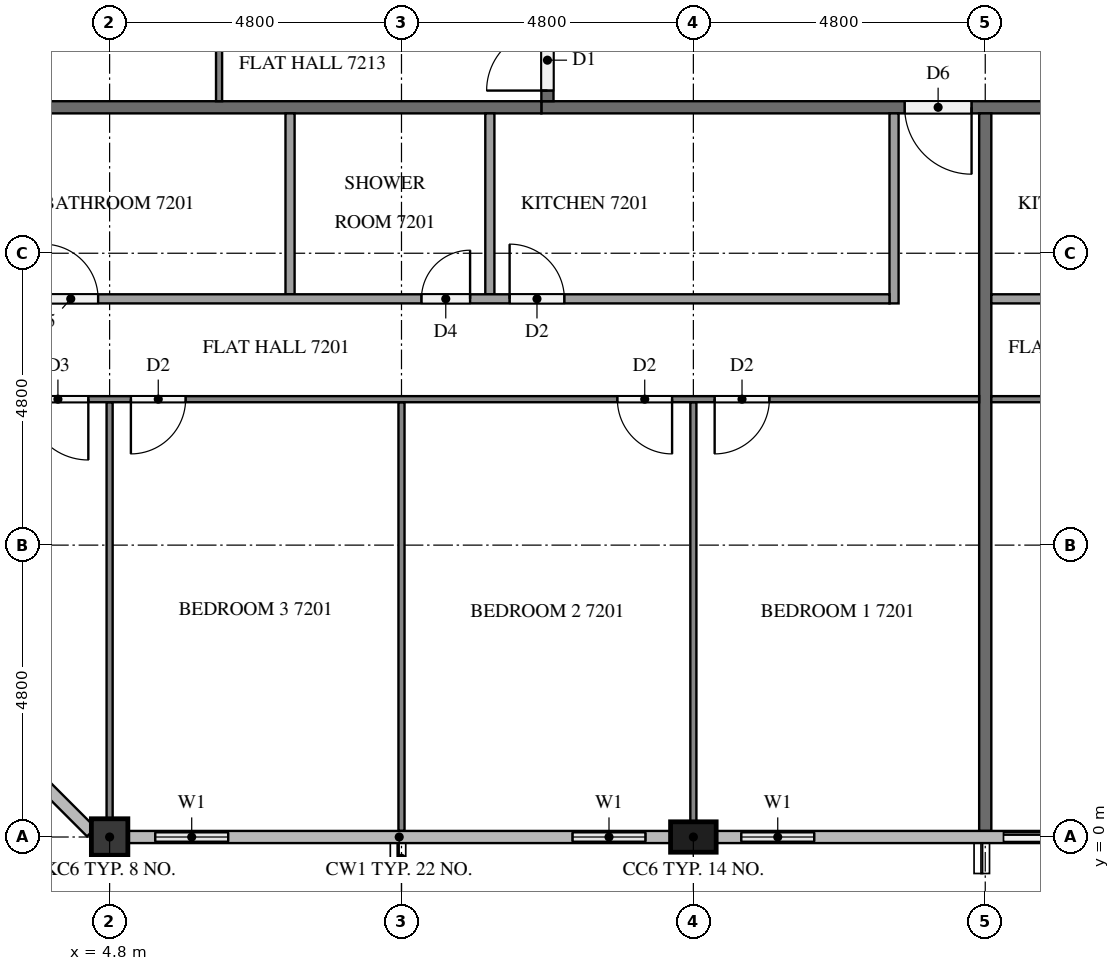
"""IFC4 building model, lengths in metres.
Left out: names, types, materials, properties, quantities, classifications, styles, units other than length and angle.
Written with IfcOpenShell. Run it as: python <this file> out.ifc"""

import sys

from ifc_helpers import new_model, si_unit, direction, frame, frame_2d, origin, origin_2d, place, context, subcontext, project, spatial, rectangle, extrude, element, fill, save


model = new_model("IFC4")
c1 = context("Model", 3, precision=1e-05, world=origin(), true_north=direction((0.0, 1.0)))
c2 = subcontext(c1, "Body", "Model", "MODEL_VIEW")
j1 = project(units=[si_unit("LENGTHUNIT", "METRE"), si_unit("PLANEANGLEUNIT", "RADIAN")], contexts=[c1])
p1 = place(None, origin())
s1 = spatial("IfcSite", under=j1, at=p1, CompositionType="ELEMENT")
p2 = place(p1, origin())
s2 = spatial("IfcBuilding", under=s1, at=p2, CompositionType="ELEMENT")
p3 = place(p2, frame((0.0, 0.0, 275.6)))
s3 = spatial("IfcBuildingStorey", under=s2, at=p3, CompositionType="ELEMENT", Elevation=275.6)
p4 = place(p3, frame((4.8, 0.0, 0.0), z_axis=(0.0, 0.0, 1.0), x_axis=(1.0, 0.0, 0.0)))
e1 = element("IfcColumn", 1, at=p4, inside=s3, PredefinedType="COLUMN", context=c2, shape_type="SweptSolid", body=[
    extrude(rectangle(XDim=0.6, YDim=0.6, at=origin_2d()), origin(), (0.0, 0.0, 1.0), 3.2),
])
p5 = place(p3, frame((14.4, 0.0, 0.0), z_axis=(0.0, 0.0, 1.0), x_axis=(1.0, 0.0, 0.0)))
e2 = element("IfcColumn", 2, at=p5, inside=s3, PredefinedType="COLUMN", context=c2, shape_type="SweptSolid", body=[
    extrude(rectangle(XDim=0.75, YDim=0.5, at=origin_2d()), origin(), (0.0, 0.0, 1.0), 3.2),
])
p6 = place(p3, frame((5.1, 0.0, 0.0), z_axis=(0.0, 0.0, 1.0), x_axis=(1.0, 0.0, 0.0)))
e3 = element("IfcWall", 3, at=p6, inside=s3, PredefinedType="SOLIDWALL", context=c2, shape_type="SweptSolid", body=[
    extrude(rectangle(XDim=2.1, YDim=0.15, at=frame_2d((1.05, 0.0))), origin(), (0.0, 0.0, 1.0), 3.2),
])
p7 = place(p6, frame((0.45, 0.0, 0.9)))
e4 = element("IfcOpeningElement", 4, at=p7, cuts=e3, PredefinedType="OPENING", context=c2, shape_type="SweptSolid", body=[
    extrude(rectangle(XDim=1.2, YDim=1.4, at=frame_2d((0.6, 0.7))), frame((0.0, 0.085, 0.0), z_axis=(0.0, -1.0, 0.0), x_axis=(1.0, 0.0, 0.0)), (0.0, 0.0, 1.0), 0.17),
])
p8 = place(p3, frame((12.0, 0.0, 0.0), z_axis=(0.0, 0.0, 1.0), x_axis=(1.0, 0.0, 0.0)))
e5 = element("IfcWall", 5, at=p8, inside=s3, PredefinedType="SOLIDWALL", context=c2, shape_type="SweptSolid", body=[
    extrude(rectangle(XDim=2.025, YDim=0.15, at=frame_2d((1.012, 0.0))), origin(), (0.0, 0.0, 1.0), 3.2),
])
p9 = place(p8, frame((0.413, 0.0, 0.9)))
e6 = element("IfcOpeningElement", 6, at=p9, cuts=e5, PredefinedType="OPENING", context=c2, shape_type="SweptSolid", body=[
    extrude(rectangle(XDim=1.2, YDim=1.4, at=frame_2d((0.6, 0.7))), frame((0.0, 0.085, 0.0), z_axis=(0.0, -1.0, 0.0), x_axis=(1.0, 0.0, 0.0)), (0.0, 0.0, 1.0), 0.17),
])
p10 = place(p3, frame((14.775, 0.0, 0.0), z_axis=(0.0, 0.0, 1.0), x_axis=(1.0, 0.0, 0.0)))
e7 = element("IfcWall", 7, at=p10, inside=s3, PredefinedType="SOLIDWALL", context=c2, shape_type="SweptSolid", body=[
    extrude(rectangle(XDim=2.025, YDim=0.15, at=frame_2d((1.013, 0.0))), origin(), (0.0, 0.0, 1.0), 3.2),
])
p11 = place(p10, frame((0.413, 0.0, 0.9)))
e8 = element("IfcOpeningElement", 8, at=p11, cuts=e7, PredefinedType="OPENING", context=c2, shape_type="SweptSolid", body=[
    extrude(rectangle(XDim=1.2, YDim=1.4, at=frame_2d((0.6, 0.7))), frame((0.0, 0.085, 0.0), z_axis=(0.0, -1.0, 0.0), x_axis=(1.0, 0.0, 0.0)), (0.0, 0.0, 1.0), 0.17),
])
p12 = place(p3, frame((19.2, 0.0, 0.0), z_axis=(0.0, 0.0, 1.0), x_axis=(1.0, 0.0, 0.0)))
e9 = element("IfcWall", 9, at=p12, inside=s3, PredefinedType="SOLIDWALL", context=c2, shape_type="SweptSolid", body=[
    extrude(rectangle(XDim=2.4, YDim=0.15, at=frame_2d((1.2, 0.0))), origin(), (0.0, 0.0, 1.0), 3.2),
])
p13 = place(p12, frame((0.3, 0.0, 0.0)))
e10 = element("IfcOpeningElement", 10, at=p13, cuts=e9, PredefinedType="OPENING", context=c2, shape_type="SweptSolid", body=[
    extrude(rectangle(XDim=1.8, YDim=2.4, at=frame_2d((0.9, 1.2))), frame((0.0, 0.085, 0.0), z_axis=(0.0, -1.0, 0.0), x_axis=(1.0, 0.0, 0.0)), (0.0, 0.0, 1.0), 0.17),
])
p14 = place(p3, frame((50.5, 12.0, 0.0), z_axis=(0.0, 0.0, 1.0), x_axis=(-1.0, 0.0, 0.0)))
e11 = element("IfcWall", 11, at=p14, inside=s3, PredefinedType="PARTITIONING", context=c2, shape_type="SweptSolid", body=[
    extrude(rectangle(XDim=38.6, YDim=0.2, at=frame_2d((19.3, 0.0))), origin(), (0.0, 0.0, 1.0), 3.2),
])
p15 = place(p14, frame((31.525, 0.0, 0.0)))
e12 = element("IfcOpeningElement", 12, at=p15, cuts=e11, PredefinedType="OPENING", context=c2, shape_type="SweptSolid", body=[
    extrude(rectangle(XDim=1.1, YDim=2.1, at=frame_2d((0.55, 1.05))), frame((0.0, 0.11, 0.0), z_axis=(0.0, -1.0, 0.0), x_axis=(1.0, 0.0, 0.0)), (0.0, 0.0, 1.0), 0.22),
])
p16 = place(p14, frame((19.575, 0.0, 0.0)))
e13 = element("IfcOpeningElement", 13, at=p16, cuts=e11, PredefinedType="OPENING", context=c2, shape_type="SweptSolid", body=[
    extrude(rectangle(XDim=1.0, YDim=2.1, at=frame_2d((0.5, 1.05))), frame((0.0, 0.11, 0.0), z_axis=(0.0, -1.0, 0.0), x_axis=(1.0, 0.0, 0.0)), (0.0, 0.0, 1.0), 0.22),
])
p17 = place(p14, frame((18.025, 0.0, 0.0)))
e14 = element("IfcOpeningElement", 14, at=p17, cuts=e11, PredefinedType="OPENING", context=c2, shape_type="SweptSolid", body=[
    extrude(rectangle(XDim=1.0, YDim=2.1, at=frame_2d((0.5, 1.05))), frame((0.0, 0.11, 0.0), z_axis=(0.0, -1.0, 0.0), x_axis=(1.0, 0.0, 0.0)), (0.0, 0.0, 1.0), 0.22),
])
p18 = place(p14, frame((1.225, 0.0, 0.0)))
e15 = element("IfcOpeningElement", 15, at=p18, cuts=e11, PredefinedType="OPENING", context=c2, shape_type="SweptSolid", body=[
    extrude(rectangle(XDim=1.0, YDim=2.1, at=frame_2d((0.5, 1.05))), frame((0.0, 0.11, 0.0), z_axis=(0.0, -1.0, 0.0), x_axis=(1.0, 0.0, 0.0)), (0.0, 0.0, 1.0), 0.22),
])
p19 = place(p3, frame((12.0, 12.1, 0.0), z_axis=(0.0, 0.0, 1.0), x_axis=(0.0, 1.0, 0.0)))
e16 = element("IfcWall", 16, at=p19, inside=s3, PredefinedType="PARTITIONING", context=c2, shape_type="SweptSolid", body=[
    extrude(rectangle(XDim=28.6, YDim=0.2, at=frame_2d((14.3, 0.0))), origin(), (0.0, 0.0, 1.0), 3.2),
])
p20 = place(p19, frame((24.175, 0.0, 0.0)))
e17 = element("IfcOpeningElement", 17, at=p20, cuts=e16, PredefinedType="OPENING", context=c2, shape_type="SweptSolid", body=[
    extrude(rectangle(XDim=1.0, YDim=2.1, at=frame_2d((0.5, 1.05))), frame((0.0, 0.11, 0.0), z_axis=(0.0, -1.0, 0.0), x_axis=(1.0, 0.0, 0.0)), (0.0, 0.0, 1.0), 0.22),
])
p21 = place(p19, frame((14.575, 0.0, 0.0)))
e18 = element("IfcOpeningElement", 18, at=p21, cuts=e16, PredefinedType="OPENING", context=c2, shape_type="SweptSolid", body=[
    extrude(rectangle(XDim=1.0, YDim=2.1, at=frame_2d((0.5, 1.05))), frame((0.0, 0.11, 0.0), z_axis=(0.0, -1.0, 0.0), x_axis=(1.0, 0.0, 0.0)), (0.0, 0.0, 1.0), 0.22),
])
p22 = place(p19, frame((0.175, 0.0, 0.0)))
e19 = element("IfcOpeningElement", 19, at=p22, cuts=e16, PredefinedType="OPENING", context=c2, shape_type="SweptSolid", body=[
    extrude(rectangle(XDim=1.0, YDim=2.1, at=frame_2d((0.5, 1.05))), frame((0.0, 0.11, 0.0), z_axis=(0.0, -1.0, 0.0), x_axis=(1.0, 0.0, 0.0)), (0.0, 0.0, 1.0), 0.22),
])
for number, where, z_axis, x_axis in (
    (20, (19.2, 11.9, 0.0), (0.0, 0.0, 1.0), (0.0, -1.0, 0.0)),
    (21, (0.1, 12.0, 0.0), (0.0, 0.0, 1.0), (1.0, 0.0, 0.0)),
):
    element("IfcWall", number, at=place(p3, frame(where, z_axis=z_axis, x_axis=x_axis)), inside=s3, PredefinedType="PARTITIONING", context=c2, shape_type="SweptSolid", body=[
        extrude(rectangle(XDim=11.8, YDim=0.2, at=frame_2d((5.9, 0.0))), origin(), (0.0, 0.0, 1.0), 3.2),
    ])
p23 = place(p3, frame((14.4, 7.15, 0.0), z_axis=(0.0, 0.0, 1.0), x_axis=(0.0, -1.0, 0.0)))
e22 = element("IfcWall", 22, at=p23, inside=s3, PredefinedType="PARTITIONING", context=c2, shape_type="SweptSolid", body=[
    extrude(rectangle(XDim=6.9, YDim=0.1, at=frame_2d((3.45, 0.0))), origin(), (0.0, 0.0, 1.0), 3.2),
])
p24 = place(p3, frame((9.6, 7.15, 0.0), z_axis=(0.0, 0.0, 1.0), x_axis=(0.0, -1.0, 0.0)))
e23 = element("IfcWall", 23, at=p24, inside=s3, PredefinedType="PARTITIONING", context=c2, shape_type="SweptSolid", body=[
    extrude(rectangle(XDim=7.05, YDim=0.1, at=frame_2d((3.525, 0.0))), origin(), (0.0, 0.0, 1.0), 3.2),
])
p25 = place(p3, frame((4.8, 7.15, 0.0), z_axis=(0.0, 0.0, 1.0), x_axis=(0.0, -1.0, 0.0)))
e24 = element("IfcWall", 24, at=p25, inside=s3, PredefinedType="PARTITIONING", context=c2, shape_type="SweptSolid", body=[
    extrude(rectangle(XDim=6.85, YDim=0.1, at=frame_2d((3.425, 0.0))), origin(), (0.0, 0.0, 1.0), 3.2),
])
p26 = place(p3, frame((19.1, 7.2, 0.0), z_axis=(0.0, 0.0, 1.0), x_axis=(-1.0, 0.0, 0.0)))
e25 = element("IfcWall", 25, at=p26, inside=s3, PredefinedType="PARTITIONING", context=c2, shape_type="SweptSolid", body=[
    extrude(rectangle(XDim=19.0, YDim=0.1, at=frame_2d((9.5, 0.0))), origin(), (0.0, 0.0, 1.0), 3.2),
])
p27 = place(p26, frame((3.45, 0.0, 0.0)))
e26 = element("IfcOpeningElement", 26, at=p27, cuts=e25, PredefinedType="OPENING", context=c2, shape_type="SweptSolid", body=[
    extrude(rectangle(XDim=0.9, YDim=2.1, at=frame_2d((0.45, 1.05))), frame((0.0, 0.06, 0.0), z_axis=(0.0, -1.0, 0.0), x_axis=(1.0, 0.0, 0.0)), (0.0, 0.0, 1.0), 0.12),
])
p28 = place(p26, frame((5.05, 0.0, 0.0)))
e27 = element("IfcOpeningElement", 27, at=p28, cuts=e25, PredefinedType="OPENING", context=c2, shape_type="SweptSolid", body=[
    extrude(rectangle(XDim=0.9, YDim=2.1, at=frame_2d((0.45, 1.05))), frame((0.0, 0.06, 0.0), z_axis=(0.0, -1.0, 0.0), x_axis=(1.0, 0.0, 0.0)), (0.0, 0.0, 1.0), 0.12),
])
p29 = place(p26, frame((13.05, 0.0, 0.0)))
e28 = element("IfcOpeningElement", 28, at=p29, cuts=e25, PredefinedType="OPENING", context=c2, shape_type="SweptSolid", body=[
    extrude(rectangle(XDim=0.9, YDim=2.1, at=frame_2d((0.45, 1.05))), frame((0.0, 0.06, 0.0), z_axis=(0.0, -1.0, 0.0), x_axis=(1.0, 0.0, 0.0)), (0.0, 0.0, 1.0), 0.12),
])
p30 = place(p26, frame((14.65, 0.0, 0.0)))
e29 = element("IfcOpeningElement", 29, at=p30, cuts=e25, PredefinedType="OPENING", context=c2, shape_type="SweptSolid", body=[
    extrude(rectangle(XDim=1.0, YDim=2.1, at=frame_2d((0.5, 1.05))), frame((0.0, 0.06, 0.0), z_axis=(0.0, -1.0, 0.0), x_axis=(1.0, 0.0, 0.0)), (0.0, 0.0, 1.0), 0.12),
])
for number, where, z_axis, x_axis in (
    (30, (11.053, 11.9, 0.0), (0.0, 0.0, 1.0), (0.0, -1.0, 0.0)),
    (31, (7.767, 11.9, 0.0), (0.0, 0.0, 1.0), (0.0, -1.0, 0.0)),
):
    element("IfcWall", number, at=place(p3, frame(where, z_axis=z_axis, x_axis=x_axis)), inside=s3, PredefinedType="PARTITIONING", context=c2, shape_type="SweptSolid", body=[
        extrude(rectangle(XDim=2.975, YDim=0.15, at=frame_2d((1.487, 0.0))), origin(), (0.0, 0.0, 1.0), 3.2),
    ])
p31 = place(p3, frame((17.7, 11.9, 0.0), z_axis=(0.0, 0.0, 1.0), x_axis=(0.0, -1.0, 0.0)))
e32 = element("IfcWall", 32, at=p31, inside=s3, PredefinedType="PARTITIONING", context=c2, shape_type="SweptSolid", body=[
    extrude(rectangle(XDim=3.125, YDim=0.15, at=frame_2d((1.562, 0.0))), origin(), (0.0, 0.0, 1.0), 3.2),
])
p32 = place(p3, frame((0.1, 8.85, 0.0), z_axis=(0.0, 0.0, 1.0), x_axis=(1.0, 0.0, 0.0)))
e33 = element("IfcWall", 33, at=p32, inside=s3, PredefinedType="PARTITIONING", context=c2, shape_type="SweptSolid", body=[
    extrude(rectangle(XDim=17.525, YDim=0.15, at=frame_2d((8.762, 0.0))), origin(), (0.0, 0.0, 1.0), 3.2),
])
p33 = place(p32, frame((11.278, 0.0, 0.0)))
e34 = element("IfcOpeningElement", 34, at=p33, cuts=e33, PredefinedType="OPENING", context=c2, shape_type="SweptSolid", body=[
    extrude(rectangle(XDim=0.9, YDim=2.1, at=frame_2d((0.45, 1.05))), frame((0.0, 0.085, 0.0), z_axis=(0.0, -1.0, 0.0), x_axis=(1.0, 0.0, 0.0)), (0.0, 0.0, 1.0), 0.17),
])
p34 = place(p32, frame((9.828, 0.0, 0.0)))
e35 = element("IfcOpeningElement", 35, at=p34, cuts=e33, PredefinedType="OPENING", context=c2, shape_type="SweptSolid", body=[
    extrude(rectangle(XDim=0.8, YDim=2.1, at=frame_2d((0.4, 1.05))), frame((0.0, 0.085, 0.0), z_axis=(0.0, -1.0, 0.0), x_axis=(1.0, 0.0, 0.0)), (0.0, 0.0, 1.0), 0.17),
])
p35 = place(p32, frame((3.611, 0.0, 0.0)))
e36 = element("IfcOpeningElement", 36, at=p35, cuts=e33, PredefinedType="OPENING", context=c2, shape_type="SweptSolid", body=[
    extrude(rectangle(XDim=0.9, YDim=2.1, at=frame_2d((0.45, 1.05))), frame((0.0, 0.085, 0.0), z_axis=(0.0, -1.0, 0.0), x_axis=(1.0, 0.0, 0.0)), (0.0, 0.0, 1.0), 0.17),
])
p36 = place(p32, frame((2.161, 0.0, 0.0)))
e37 = element("IfcOpeningElement", 37, at=p36, cuts=e33, PredefinedType="OPENING", context=c2, shape_type="SweptSolid", body=[
    extrude(rectangle(XDim=0.8, YDim=2.1, at=frame_2d((0.4, 1.05))), frame((0.0, 0.085, 0.0), z_axis=(0.0, -1.0, 0.0), x_axis=(1.0, 0.0, 0.0)), (0.0, 0.0, 1.0), 0.17),
])
p37 = place(p3, frame((31.1, 7.2, 0.0), z_axis=(0.0, 0.0, 1.0), x_axis=(-1.0, 0.0, 0.0)))
e38 = element("IfcWall", 38, at=p37, inside=s3, PredefinedType="PARTITIONING", context=c2, shape_type="SweptSolid", body=[
    extrude(rectangle(XDim=11.8, YDim=0.1, at=frame_2d((5.9, 0.0))), origin(), (0.0, 0.0, 1.0), 3.2),
])
p38 = place(p37, frame((3.45, 0.0, 0.0)))
e39 = element("IfcOpeningElement", 39, at=p38, cuts=e38, PredefinedType="OPENING", context=c2, shape_type="SweptSolid", body=[
    extrude(rectangle(XDim=0.9, YDim=2.1, at=frame_2d((0.45, 1.05))), frame((0.0, 0.06, 0.0), z_axis=(0.0, -1.0, 0.0), x_axis=(1.0, 0.0, 0.0)), (0.0, 0.0, 1.0), 0.12),
])
p39 = place(p37, frame((5.05, 0.0, 0.0)))
e40 = element("IfcOpeningElement", 40, at=p39, cuts=e38, PredefinedType="OPENING", context=c2, shape_type="SweptSolid", body=[
    extrude(rectangle(XDim=1.0, YDim=2.1, at=frame_2d((0.5, 1.05))), frame((0.0, 0.06, 0.0), z_axis=(0.0, -1.0, 0.0), x_axis=(1.0, 0.0, 0.0)), (0.0, 0.0, 1.0), 0.12),
])
p40 = place(p3, frame((19.3, 8.85, 0.0), z_axis=(0.0, 0.0, 1.0), x_axis=(1.0, 0.0, 0.0)))
e41 = element("IfcWall", 41, at=p40, inside=s3, PredefinedType="PARTITIONING", context=c2, shape_type="SweptSolid", body=[
    extrude(rectangle(XDim=10.325, YDim=0.15, at=frame_2d((5.163, 0.0))), origin(), (0.0, 0.0, 1.0), 3.2),
])
p41 = place(p40, frame((6.52, 0.0, 0.0)))
e42 = element("IfcOpeningElement", 42, at=p41, cuts=e41, PredefinedType="OPENING", context=c2, shape_type="SweptSolid", body=[
    extrude(rectangle(XDim=0.8, YDim=2.1, at=frame_2d((0.4, 1.05))), frame((0.0, 0.085, 0.0), z_axis=(0.0, -1.0, 0.0), x_axis=(1.0, 0.0, 0.0)), (0.0, 0.0, 1.0), 0.17),
])
p42 = place(p40, frame((4.97, 0.0, 0.0)))
e43 = element("IfcOpeningElement", 43, at=p42, cuts=e41, PredefinedType="OPENING", context=c2, shape_type="SweptSolid", body=[
    extrude(rectangle(XDim=0.9, YDim=2.1, at=frame_2d((0.45, 1.05))), frame((0.0, 0.085, 0.0), z_axis=(0.0, -1.0, 0.0), x_axis=(1.0, 0.0, 0.0)), (0.0, 0.0, 1.0), 0.17),
])
p43 = place(p3, frame((6.6, 12.1, 0.0), z_axis=(0.0, 0.0, 1.0), x_axis=(0.0, 1.0, 0.0)))
e44 = element("IfcWall", 44, at=p43, inside=s3, PredefinedType="PARTITIONING", context=c2, shape_type="SweptSolid", body=[
    extrude(rectangle(XDim=14.2, YDim=0.1, at=frame_2d((7.1, 0.0))), origin(), (0.0, 0.0, 1.0), 3.2),
])
p44 = place(p43, frame((3.35, 0.0, 0.0)))
e45 = element("IfcOpeningElement", 45, at=p44, cuts=e44, PredefinedType="OPENING", context=c2, shape_type="SweptSolid", body=[
    extrude(rectangle(XDim=1.0, YDim=2.1, at=frame_2d((0.5, 1.05))), frame((0.0, 0.06, 0.0), z_axis=(0.0, -1.0, 0.0), x_axis=(1.0, 0.0, 0.0)), (0.0, 0.0, 1.0), 0.12),
])
p45 = place(p43, frame((5.05, 0.0, 0.0)))
e46 = element("IfcOpeningElement", 46, at=p45, cuts=e44, PredefinedType="OPENING", context=c2, shape_type="SweptSolid", body=[
    extrude(rectangle(XDim=0.9, YDim=2.1, at=frame_2d((0.45, 1.05))), frame((0.0, 0.06, 0.0), z_axis=(0.0, -1.0, 0.0), x_axis=(1.0, 0.0, 0.0)), (0.0, 0.0, 1.0), 0.12),
])
p46 = place(p43, frame((13.0, 0.0, 0.0)))
e47 = element("IfcOpeningElement", 47, at=p46, cuts=e44, PredefinedType="OPENING", context=c2, shape_type="SweptSolid", body=[
    extrude(rectangle(XDim=0.9, YDim=2.1, at=frame_2d((0.45, 1.05))), frame((0.0, 0.06, 0.0), z_axis=(0.0, -1.0, 0.0), x_axis=(1.0, 0.0, 0.0)), (0.0, 0.0, 1.0), 0.12),
])
p47 = place(p7, origin())
e48 = element("IfcWindow", 48, at=p47, inside=s3, PartitioningType="SINGLE_PANEL", PredefinedType="WINDOW", context=c2, shape_type="SweptSolid", body=[
    extrude(rectangle(XDim=1.2, YDim=1.4, at=frame_2d((0.6, 0.7))), frame((0.0, 0.03, 0.0), z_axis=(0.0, -1.0, 0.0), x_axis=(1.0, 0.0, 0.0)), (0.0, 0.0, 1.0), 0.06),
])
fill(e4, e48)
p48 = place(p9, origin())
e49 = element("IfcWindow", 49, at=p48, inside=s3, PartitioningType="SINGLE_PANEL", PredefinedType="WINDOW", context=c2, shape_type="SweptSolid", body=[
    extrude(rectangle(XDim=1.2, YDim=1.4, at=frame_2d((0.6, 0.7))), frame((0.0, 0.03, 0.0), z_axis=(0.0, -1.0, 0.0), x_axis=(1.0, 0.0, 0.0)), (0.0, 0.0, 1.0), 0.06),
])
fill(e6, e49)
p49 = place(p11, origin())
e50 = element("IfcWindow", 50, at=p49, inside=s3, PartitioningType="SINGLE_PANEL", PredefinedType="WINDOW", context=c2, shape_type="SweptSolid", body=[
    extrude(rectangle(XDim=1.2, YDim=1.4, at=frame_2d((0.6, 0.7))), frame((0.0, 0.03, 0.0), z_axis=(0.0, -1.0, 0.0), x_axis=(1.0, 0.0, 0.0)), (0.0, 0.0, 1.0), 0.06),
])
fill(e8, e50)
p50 = place(p13, origin())
e51 = element("IfcDoor", 51, at=p50, inside=s3, OperationType="SLIDING_TO_LEFT", PredefinedType="DOOR", context=c2, shape_type="SweptSolid", body=[
    extrude(rectangle(XDim=1.8, YDim=2.4, at=frame_2d((0.9, 1.2))), frame((0.0, 0.025, 0.0), z_axis=(0.0, -1.0, 0.0), x_axis=(1.0, 0.0, 0.0)), (0.0, 0.0, 1.0), 0.05),
])
fill(e10, e51)
p51 = place(p15, origin())
e52 = element("IfcDoor", 52, at=p51, inside=s3, OperationType="SINGLE_SWING_LEFT", PredefinedType="DOOR", context=c2, shape_type="SweptSolid", body=[
    extrude(rectangle(XDim=1.1, YDim=2.1, at=frame_2d((0.55, 1.05))), frame((0.0, 0.025, 0.0), z_axis=(0.0, -1.0, 0.0), x_axis=(1.0, 0.0, 0.0)), (0.0, 0.0, 1.0), 0.05),
])
fill(e12, e52)
p52 = place(p22, origin())
e53 = element("IfcDoor", 53, at=p52, inside=s3, OperationType="SINGLE_SWING_LEFT", PredefinedType="DOOR", context=c2, shape_type="SweptSolid", body=[
    extrude(rectangle(XDim=1.0, YDim=2.1, at=frame_2d((0.5, 1.05))), frame((0.0, 0.025, 0.0), z_axis=(0.0, -1.0, 0.0), x_axis=(1.0, 0.0, 0.0)), (0.0, 0.0, 1.0), 0.05),
])
fill(e19, e53)
p53 = place(p27, origin())
e54 = element("IfcDoor", 54, at=p53, inside=s3, OperationType="SINGLE_SWING_RIGHT", PredefinedType="DOOR", context=c2, shape_type="SweptSolid", body=[
    extrude(rectangle(XDim=0.9, YDim=2.1, at=frame_2d((0.45, 1.05))), frame((0.0, 0.025, 0.0), z_axis=(0.0, -1.0, 0.0), x_axis=(1.0, 0.0, 0.0)), (0.0, 0.0, 1.0), 0.05),
])
fill(e26, e54)
p54 = place(p28, origin())
e55 = element("IfcDoor", 55, at=p54, inside=s3, OperationType="SINGLE_SWING_LEFT", PredefinedType="DOOR", context=c2, shape_type="SweptSolid", body=[
    extrude(rectangle(XDim=0.9, YDim=2.1, at=frame_2d((0.45, 1.05))), frame((0.0, 0.025, 0.0), z_axis=(0.0, -1.0, 0.0), x_axis=(1.0, 0.0, 0.0)), (0.0, 0.0, 1.0), 0.05),
])
fill(e27, e55)
p55 = place(p29, origin())
e56 = element("IfcDoor", 56, at=p55, inside=s3, OperationType="SINGLE_SWING_RIGHT", PredefinedType="DOOR", context=c2, shape_type="SweptSolid", body=[
    extrude(rectangle(XDim=0.9, YDim=2.1, at=frame_2d((0.45, 1.05))), frame((0.0, 0.025, 0.0), z_axis=(0.0, -1.0, 0.0), x_axis=(1.0, 0.0, 0.0)), (0.0, 0.0, 1.0), 0.05),
])
fill(e28, e56)
p56 = place(p30, origin())
e57 = element("IfcDoor", 57, at=p56, inside=s3, OperationType="SINGLE_SWING_LEFT", PredefinedType="DOOR", context=c2, shape_type="SweptSolid", body=[
    extrude(rectangle(XDim=1.0, YDim=2.1, at=frame_2d((0.5, 1.05))), frame((0.0, 0.025, 0.0), z_axis=(0.0, -1.0, 0.0), x_axis=(1.0, 0.0, 0.0)), (0.0, 0.0, 1.0), 0.05),
])
fill(e29, e57)
p57 = place(p33, origin())
e58 = element("IfcDoor", 58, at=p57, inside=s3, OperationType="SINGLE_SWING_LEFT", PredefinedType="DOOR", context=c2, shape_type="SweptSolid", body=[
    extrude(rectangle(XDim=0.9, YDim=2.1, at=frame_2d((0.45, 1.05))), frame((0.0, 0.025, 0.0), z_axis=(0.0, -1.0, 0.0), x_axis=(1.0, 0.0, 0.0)), (0.0, 0.0, 1.0), 0.05),
])
fill(e34, e58)
p58 = place(p34, origin())
e59 = element("IfcDoor", 59, at=p58, inside=s3, OperationType="SINGLE_SWING_RIGHT", PredefinedType="DOOR", context=c2, shape_type="SweptSolid", body=[
    extrude(rectangle(XDim=0.8, YDim=2.1, at=frame_2d((0.4, 1.05))), frame((0.0, 0.025, 0.0), z_axis=(0.0, -1.0, 0.0), x_axis=(1.0, 0.0, 0.0)), (0.0, 0.0, 1.0), 0.05),
])
fill(e35, e59)
p59 = place(p35, origin())
e60 = element("IfcDoor", 60, at=p59, inside=s3, OperationType="SINGLE_SWING_LEFT", PredefinedType="DOOR", context=c2, shape_type="SweptSolid", body=[
    extrude(rectangle(XDim=0.9, YDim=2.1, at=frame_2d((0.45, 1.05))), frame((0.0, 0.025, 0.0), z_axis=(0.0, -1.0, 0.0), x_axis=(1.0, 0.0, 0.0)), (0.0, 0.0, 1.0), 0.05),
])
fill(e36, e60)
save(model, sys.argv[1])
